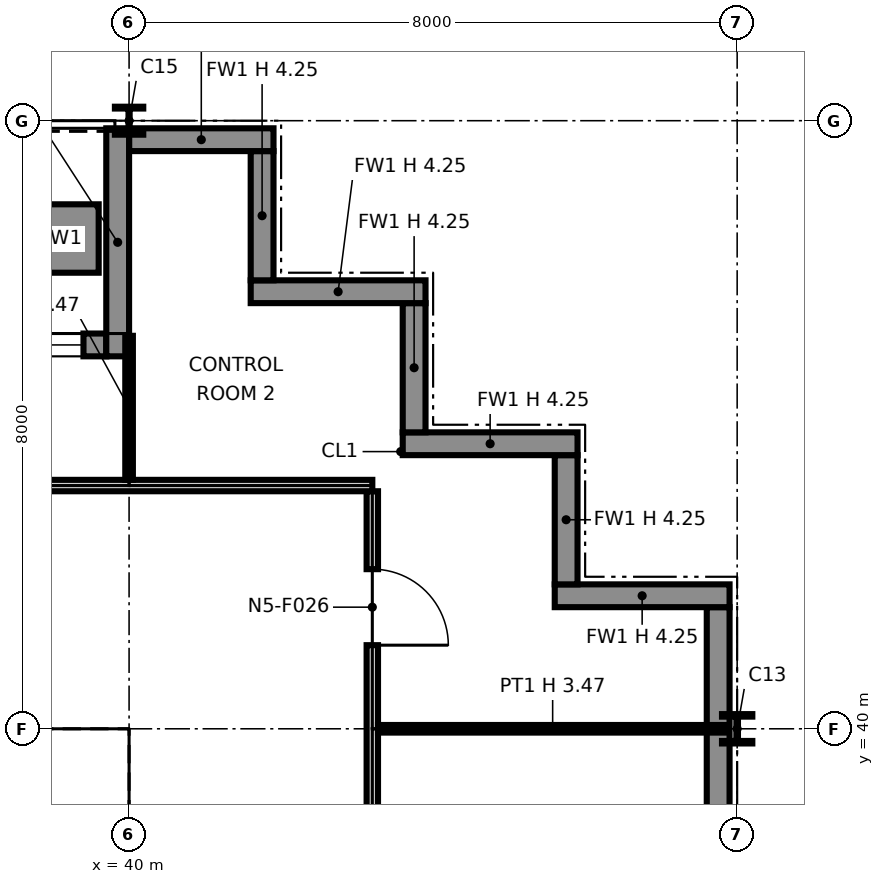
"""IFC4 building model, lengths in metres.
Left out: names, types, materials, properties, quantities, classifications, styles, units other than length and angle.
Written with IfcOpenShell. Run it as: python <this file> out.ifc"""

import sys

from ifc_helpers import new_model, si_unit, direction, frame, frame_2d, origin, origin_2d, place, context, subcontext, project, spatial, polyline, rectangle, i_section, outline, extrude, element, fill, save


model = new_model("IFC4")
c1 = context("Model", 3, precision=1e-05, world=origin(), true_north=direction((0.0, 1.0)))
c2 = subcontext(c1, "Body", "Model", "MODEL_VIEW")
j1 = project(units=[si_unit("LENGTHUNIT", "METRE"), si_unit("PLANEANGLEUNIT", "RADIAN")], contexts=[c1])
p1 = place(None, origin())
s1 = spatial("IfcSite", under=j1, at=p1, CompositionType="ELEMENT")
p2 = place(p1, origin())
s2 = spatial("IfcBuilding", under=s1, at=p2, CompositionType="ELEMENT")
p3 = place(p2, frame((0.0, 0.0, 87.6)))
s3 = spatial("IfcBuildingStorey", under=s2, at=p3, CompositionType="ELEMENT", Elevation=87.6)
p4 = place(p3, frame((40.0, 40.0, 0.0), z_axis=(0.0, 0.0, 1.0), x_axis=(1.0, 0.0, 0.0)))
e1 = element("IfcColumn", 1, at=p4, inside=s3, PredefinedType="COLUMN", context=c2, shape_type="SweptSolid", body=[
    extrude(i_section(OverallWidth=0.257, OverallDepth=0.363, WebThickness=0.013, FlangeThickness=0.022, at=origin_2d()), origin(), (0.0, 0.0, 1.0), 4.25),
])
p5 = place(p3, frame((40.0, 48.0, 0.0), z_axis=(0.0, 0.0, 1.0), x_axis=(1.0, 0.0, 0.0)))
e2 = element("IfcColumn", 2, at=p5, inside=s3, PredefinedType="COLUMN", context=c2, shape_type="SweptSolid", body=[
    extrude(i_section(OverallWidth=0.373, OverallDepth=0.368, WebThickness=0.015, FlangeThickness=0.024, at=origin_2d()), origin(), (0.0, 0.0, 1.0), 4.25),
])
p6 = place(p3, frame((48.0, 40.0, 0.0), z_axis=(0.0, 0.0, 1.0), x_axis=(1.0, 0.0, 0.0)))
e3 = element("IfcColumn", 3, at=p6, inside=s3, PredefinedType="COLUMN", context=c2, shape_type="SweptSolid", body=[
    extrude(i_section(OverallWidth=0.399, OverallDepth=0.386, WebThickness=0.021, FlangeThickness=0.033, at=origin_2d()), origin(), (0.0, 0.0, 1.0), 4.25),
])
p7 = place(p3, frame((47.75, 32.0, 0.0), z_axis=(0.0, 0.0, 1.0), x_axis=(0.0, 1.0, 0.0)))
e4 = element("IfcWall", 4, at=p7, inside=s3, PredefinedType="SOLIDWALL", context=c2, shape_type="SweptSolid", body=[
    extrude(rectangle(XDim=9.6, YDim=0.3, at=frame_2d((4.8, 0.0))), origin(), (0.0, 0.0, 1.0), 4.25),
])
p8 = place(p3, frame((47.9, 41.75, 0.0), z_axis=(0.0, 0.0, 1.0), x_axis=(-1.0, 0.0, 0.0)))
e5 = element("IfcWall", 5, at=p8, inside=s3, PredefinedType="SOLIDWALL", context=c2, shape_type="SweptSolid", body=[
    extrude(rectangle(XDim=2.3, YDim=0.3, at=frame_2d((1.15, 0.0))), origin(), (0.0, 0.0, 1.0), 4.25),
])
p9 = place(p3, frame((45.75, 41.9, 0.0), z_axis=(0.0, 0.0, 1.0), x_axis=(0.0, 1.0, 0.0)))
e6 = element("IfcWall", 6, at=p9, inside=s3, PredefinedType="SOLIDWALL", context=c2, shape_type="SweptSolid", body=[
    extrude(rectangle(XDim=1.7, YDim=0.3, at=frame_2d((0.85, 0.0))), origin(), (0.0, 0.0, 1.0), 4.25),
])
p10 = place(p3, frame((45.9, 43.75, 0.0), z_axis=(0.0, 0.0, 1.0), x_axis=(-1.0, 0.0, 0.0)))
e7 = element("IfcWall", 7, at=p10, inside=s3, PredefinedType="SOLIDWALL", context=c2, shape_type="SweptSolid", body=[
    extrude(rectangle(XDim=2.3, YDim=0.3, at=frame_2d((1.15, 0.0))), origin(), (0.0, 0.0, 1.0), 4.25),
])
p11 = place(p3, frame((43.75, 43.9, 0.0), z_axis=(0.0, 0.0, 1.0), x_axis=(0.0, 1.0, 0.0)))
e8 = element("IfcWall", 8, at=p11, inside=s3, PredefinedType="SOLIDWALL", context=c2, shape_type="SweptSolid", body=[
    extrude(rectangle(XDim=1.7, YDim=0.3, at=frame_2d((0.85, 0.0))), origin(), (0.0, 0.0, 1.0), 4.25),
])
p12 = place(p3, frame((43.9, 45.75, 0.0), z_axis=(0.0, 0.0, 1.0), x_axis=(-1.0, 0.0, 0.0)))
e9 = element("IfcWall", 9, at=p12, inside=s3, PredefinedType="SOLIDWALL", context=c2, shape_type="SweptSolid", body=[
    extrude(rectangle(XDim=2.3, YDim=0.3, at=frame_2d((1.15, 0.0))), origin(), (0.0, 0.0, 1.0), 4.25),
])
p13 = place(p3, frame((41.75, 45.9, 0.0), z_axis=(0.0, 0.0, 1.0), x_axis=(0.0, 1.0, 0.0)))
e10 = element("IfcWall", 10, at=p13, inside=s3, PredefinedType="SOLIDWALL", context=c2, shape_type="SweptSolid", body=[
    extrude(rectangle(XDim=1.7, YDim=0.3, at=frame_2d((0.85, 0.0))), origin(), (0.0, 0.0, 1.0), 4.25),
])
p14 = place(p3, frame((41.9, 47.75, 0.0), z_axis=(0.0, 0.0, 1.0), x_axis=(-1.0, 0.0, 0.0)))
e11 = element("IfcWall", 11, at=p14, inside=s3, PredefinedType="SOLIDWALL", context=c2, shape_type="SweptSolid", body=[
    extrude(rectangle(XDim=1.9, YDim=0.3, at=frame_2d((0.95, 0.0))), origin(), (0.0, 0.0, 1.0), 4.25),
])
p15 = place(p3, frame((39.7, 45.05, 0.0), z_axis=(0.0, 0.0, 1.0), x_axis=(-1.0, 0.0, 0.0)))
e12 = element("IfcWall", 12, at=p15, inside=s3, PredefinedType="SOLIDWALL", context=c2, shape_type="SweptSolid", body=[
    extrude(rectangle(XDim=7.4, YDim=0.3, at=frame_2d((3.7, 0.0))), origin(), (0.0, 0.0, 1.0), 4.25),
])
p16 = place(p15, frame((0.3, 0.0, 0.9)))
e13 = element("IfcOpeningElement", 13, at=p16, cuts=e12, PredefinedType="OPENING", context=c2, shape_type="SweptSolid", body=[
    extrude(rectangle(XDim=2.8, YDim=2.2, at=frame_2d((1.4, 1.1))), frame((0.0, 0.16, 0.0), z_axis=(0.0, -1.0, 0.0), x_axis=(1.0, 0.0, 0.0)), (0.0, 0.0, 1.0), 0.32),
])
p17 = place(p15, frame((4.7, 0.0, 0.0)))
e14 = element("IfcOpeningElement", 14, at=p17, cuts=e12, PredefinedType="OPENING", context=c2, shape_type="SweptSolid", body=[
    extrude(rectangle(XDim=2.0, YDim=2.4, at=frame_2d((1.0, 1.2))), frame((0.0, 0.16, 0.0), z_axis=(0.0, -1.0, 0.0), x_axis=(1.0, 0.0, 0.0)), (0.0, 0.0, 1.0), 0.32),
])
p18 = place(p3, frame((39.85, 47.9, 0.0), z_axis=(0.0, 0.0, 1.0), x_axis=(0.0, -1.0, 0.0)))
e15 = element("IfcWall", 15, at=p18, inside=s3, PredefinedType="SOLIDWALL", context=c2, shape_type="SweptSolid", body=[
    extrude(rectangle(XDim=3.0, YDim=0.3, at=frame_2d((1.5, 0.0))), origin(), (0.0, 0.0, 1.0), 3.469),
])
p19 = place(p3, frame((39.6, 46.45, 0.0), z_axis=(0.0, 0.0, 1.0), x_axis=(-1.0, 0.0, 0.0)))
e16 = element("IfcWall", 16, at=p19, inside=s3, PredefinedType="SOLIDWALL", context=c2, shape_type="SweptSolid", body=[
    extrude(rectangle(XDim=3.2, YDim=0.9, at=frame_2d((1.6, 0.0))), origin(), (0.0, 0.0, 1.0), 0.6),
])
p20 = place(p3, frame((24.65, 39.25, 0.0), z_axis=(0.0, 0.0, 1.0), x_axis=(1.0, 0.0, 0.0)))
e17 = element("IfcWall", 17, at=p20, inside=s3, PredefinedType="PARTITIONING", context=c2, shape_type="SweptSolid", body=[
    extrude(outline(polyline([(0.0, 0.0), (14.7, 0.0), (14.7, 4.25), (7.469, 4.25), (7.469, 3.632), (7.231, 3.632), (7.23, 4.25), (0.0, 4.25), (0.0, 0.0)])), frame((0.0, 0.1, 0.0), z_axis=(0.0, -1.0, 0.0), x_axis=(1.0, 0.0, 0.0)), (0.0, 0.0, 1.0), 0.2),
])
p21 = place(p3, frame((39.25, 32.85, 0.0), z_axis=(0.0, 0.0, 1.0), x_axis=(0.0, 1.0, 0.0)))
e18 = element("IfcWall", 18, at=p21, inside=s3, PredefinedType="PARTITIONING", context=c2, shape_type="SweptSolid", body=[
    extrude(rectangle(XDim=6.3, YDim=0.2, at=frame_2d((3.15, 0.0))), origin(), (0.0, 0.0, 1.0), 4.25),
])
p22 = place(p3, frame((43.2, 16.0, 0.0), z_axis=(0.0, 0.0, 1.0), x_axis=(0.0, 1.0, 0.0)))
e19 = element("IfcWall", 19, at=p22, inside=s3, PredefinedType="PARTITIONING", context=c2, shape_type="SweptSolid", body=[
    extrude(outline(polyline([(0.0, 0.0), (27.125, 0.0), (27.125, 4.25), (24.3, 4.25), (24.298, 3.47), (23.702, 3.47), (23.7, 4.25), (20.3, 4.25), (20.298, 3.47), (19.702, 3.47), (19.7, 4.25), (16.3, 4.25), (16.298, 3.47), (15.702, 3.47), (15.7, 4.25), (12.3, 4.25), (12.298, 3.47), (11.702, 3.47), (11.7, 4.25), (8.3, 4.25), (8.298, 3.47), (7.702, 3.47), (7.7, 4.25), (4.3, 4.25), (4.298, 3.47), (3.702, 3.47), (3.7, 4.25), (0.0, 4.25), (0.0, 0.0)])), frame((0.0, 0.075, 0.0), z_axis=(0.0, -1.0, 0.0), x_axis=(1.0, 0.0, 0.0)), (0.0, 0.0, 1.0), 0.15),
])
p23 = place(p22, frame((2.5, 0.0, 0.0), z_axis=(0.0, 0.0, 1.0), x_axis=(-1.0, 0.0, 0.0)))
e20 = element("IfcOpeningElement", 20, at=p23, cuts=e19, PredefinedType="OPENING", context=c2, shape_type="SweptSolid", body=[
    extrude(rectangle(XDim=1.0, YDim=2.1, at=frame_2d((0.5, 1.05))), frame((0.0, 0.085, 0.0), z_axis=(0.0, -1.0, 0.0), x_axis=(1.0, 0.0, 0.0)), (0.0, 0.0, 1.0), 0.17),
])
p24 = place(p22, frame((12.5, 0.0, 0.0), z_axis=(0.0, 0.0, 1.0), x_axis=(-1.0, 0.0, 0.0)))
e21 = element("IfcOpeningElement", 21, at=p24, cuts=e19, PredefinedType="OPENING", context=c2, shape_type="SweptSolid", body=[
    extrude(rectangle(XDim=1.0, YDim=2.1, at=frame_2d((0.5, 1.05))), frame((0.0, 0.085, 0.0), z_axis=(0.0, -1.0, 0.0), x_axis=(1.0, 0.0, 0.0)), (0.0, 0.0, 1.0), 0.17),
])
p25 = place(p22, frame((18.5, 0.0, 0.0), z_axis=(0.0, 0.0, 1.0), x_axis=(-1.0, 0.0, 0.0)))
e22 = element("IfcOpeningElement", 22, at=p25, cuts=e19, PredefinedType="OPENING", context=c2, shape_type="SweptSolid", body=[
    extrude(rectangle(XDim=1.0, YDim=2.1, at=frame_2d((0.5, 1.05))), frame((0.0, 0.085, 0.0), z_axis=(0.0, -1.0, 0.0), x_axis=(1.0, 0.0, 0.0)), (0.0, 0.0, 1.0), 0.17),
])
p26 = place(p22, frame((22.5, 0.0, 0.0), z_axis=(0.0, 0.0, 1.0), x_axis=(-1.0, 0.0, 0.0)))
e23 = element("IfcOpeningElement", 23, at=p26, cuts=e19, PredefinedType="OPENING", context=c2, shape_type="SweptSolid", body=[
    extrude(rectangle(XDim=1.0, YDim=2.1, at=frame_2d((0.5, 1.05))), frame((0.0, 0.085, 0.0), z_axis=(0.0, -1.0, 0.0), x_axis=(1.0, 0.0, 0.0)), (0.0, 0.0, 1.0), 0.17),
])
p27 = place(p22, frame((26.1, 0.0, 0.0), z_axis=(0.0, 0.0, 1.0), x_axis=(-1.0, 0.0, 0.0)))
e24 = element("IfcOpeningElement", 24, at=p27, cuts=e19, PredefinedType="OPENING", context=c2, shape_type="SweptSolid", body=[
    extrude(rectangle(XDim=1.0, YDim=2.1, at=frame_2d((0.5, 1.05))), frame((0.0, 0.085, 0.0), z_axis=(0.0, -1.0, 0.0), x_axis=(1.0, 0.0, 0.0)), (0.0, 0.0, 1.0), 0.17),
])
p28 = place(p3, frame((43.275, 40.0, 0.0), z_axis=(0.0, 0.0, 1.0), x_axis=(1.0, 0.0, 0.0)))
e25 = element("IfcWall", 25, at=p28, inside=s3, PredefinedType="PARTITIONING", context=c2, shape_type="SweptSolid", body=[
    extrude(rectangle(XDim=4.595, YDim=0.1, at=frame_2d((2.298, 0.0))), origin(), (0.0, 0.0, 1.0), 3.47),
])
p29 = place(p3, frame((8.05, 43.2, 0.0), z_axis=(0.0, 0.0, 1.0), x_axis=(1.0, 0.0, 0.0)))
e26 = element("IfcWall", 26, at=p29, inside=s3, PredefinedType="PARTITIONING", context=c2, shape_type="SweptSolid", body=[
    extrude(rectangle(XDim=35.15, YDim=0.15, at=frame_2d((17.575, 0.0))), origin(), (0.0, 0.0, 1.0), 4.25),
])
p30 = place(p29, frame((3.45, 0.0, 0.0)))
e27 = element("IfcOpeningElement", 27, at=p30, cuts=e26, PredefinedType="OPENING", context=c2, shape_type="SweptSolid", body=[
    extrude(rectangle(XDim=1.0, YDim=2.1, at=frame_2d((0.5, 1.05))), frame((0.0, 0.085, 0.0), z_axis=(0.0, -1.0, 0.0), x_axis=(1.0, 0.0, 0.0)), (0.0, 0.0, 1.0), 0.17),
])
p31 = place(p29, frame((11.45, 0.0, 0.0)))
e28 = element("IfcOpeningElement", 28, at=p31, cuts=e26, PredefinedType="OPENING", context=c2, shape_type="SweptSolid", body=[
    extrude(rectangle(XDim=1.0, YDim=2.1, at=frame_2d((0.5, 1.05))), frame((0.0, 0.085, 0.0), z_axis=(0.0, -1.0, 0.0), x_axis=(1.0, 0.0, 0.0)), (0.0, 0.0, 1.0), 0.17),
])
p32 = place(p29, frame((19.45, 0.0, 0.0)))
e29 = element("IfcOpeningElement", 29, at=p32, cuts=e26, PredefinedType="OPENING", context=c2, shape_type="SweptSolid", body=[
    extrude(rectangle(XDim=1.0, YDim=2.1, at=frame_2d((0.5, 1.05))), frame((0.0, 0.085, 0.0), z_axis=(0.0, -1.0, 0.0), x_axis=(1.0, 0.0, 0.0)), (0.0, 0.0, 1.0), 0.17),
])
p33 = place(p29, frame((29.45, 0.0, 0.0)))
e30 = element("IfcOpeningElement", 30, at=p33, cuts=e26, PredefinedType="OPENING", context=c2, shape_type="SweptSolid", body=[
    extrude(rectangle(XDim=1.0, YDim=2.1, at=frame_2d((0.5, 1.05))), frame((0.0, 0.085, 0.0), z_axis=(0.0, -1.0, 0.0), x_axis=(1.0, 0.0, 0.0)), (0.0, 0.0, 1.0), 0.17),
])
p34 = place(p3, frame((40.0, 43.275, 0.0), z_axis=(0.0, 0.0, 1.0), x_axis=(0.0, 1.0, 0.0)))
e31 = element("IfcWall", 31, at=p34, inside=s3, PredefinedType="PARTITIONING", context=c2, shape_type="SweptSolid", body=[
    extrude(rectangle(XDim=1.895, YDim=0.1, at=frame_2d((0.948, 0.0))), origin(), (0.0, 0.0, 1.0), 3.47),
])
p35 = place(p16, origin())
e32 = element("IfcWindow", 32, at=p35, inside=s3, PartitioningType="SINGLE_PANEL", PredefinedType="WINDOW", context=c2, shape_type="SweptSolid", body=[
    extrude(rectangle(XDim=2.8, YDim=2.2, at=frame_2d((1.4, 1.1))), frame((0.0, 0.03, 0.0), z_axis=(0.0, -1.0, 0.0), x_axis=(1.0, 0.0, 0.0)), (0.0, 0.0, 1.0), 0.06),
])
fill(e13, e32)
p36 = place(p27, origin())
e33 = element("IfcDoor", 33, at=p36, inside=s3, OperationType="SINGLE_SWING_RIGHT", PredefinedType="DOOR", context=c2, shape_type="SweptSolid", body=[
    extrude(rectangle(XDim=1.0, YDim=2.1, at=frame_2d((0.5, 1.05))), frame((0.0, 0.025, 0.0), z_axis=(0.0, -1.0, 0.0), x_axis=(1.0, 0.0, 0.0)), (0.0, 0.0, 1.0), 0.05),
])
fill(e24, e33)
save(model, sys.argv[1])
